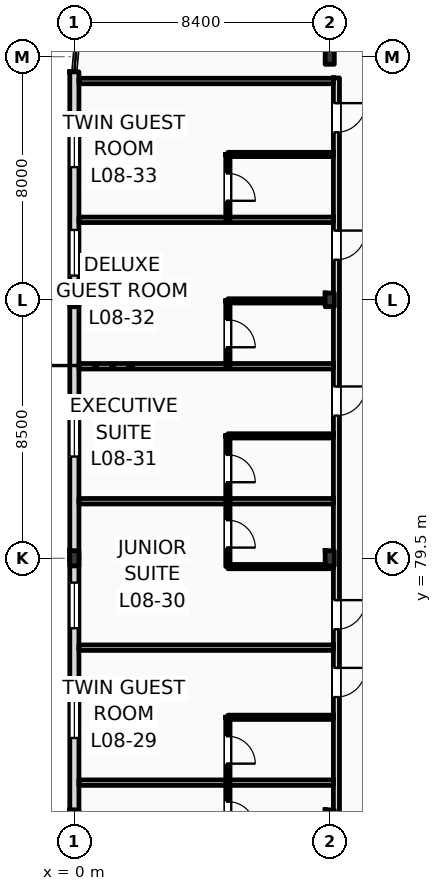
"""IFC4 building model, lengths in metres.
Left out: names, types, materials, properties, quantities, classifications, styles, units other than length and angle.
Written with IfcOpenShell. Run it as: python <this file> out.ifc"""

import sys

from ifc_helpers import new_model, si_unit, direction, frame, frame_2d, origin, origin_2d, place, context, subcontext, project, spatial, rectangle, i_section, extrude, element, fill, save


model = new_model("IFC4")
c1 = context("Model", 3, precision=1e-05, world=origin(), true_north=direction((0.0, 1.0)))
c2 = subcontext(c1, "Body", "Model", "MODEL_VIEW")
j1 = project(units=[si_unit("LENGTHUNIT", "METRE"), si_unit("PLANEANGLEUNIT", "RADIAN")], contexts=[c1])
p1 = place(None, origin())
s1 = spatial("IfcSite", under=j1, at=p1, CompositionType="ELEMENT")
p2 = place(p1, origin())
s2 = spatial("IfcBuilding", under=s1, at=p2, CompositionType="ELEMENT")
p3 = place(p2, frame((0.0, 0.0, 35.4)))
s3 = spatial("IfcBuildingStorey", under=s2, at=p3, CompositionType="ELEMENT", Elevation=35.4)
p4 = place(p3, frame((0.0, 71.0, 0.0), z_axis=(0.0, 0.0, 1.0), x_axis=(1.0, 0.0, 0.0)))
e1 = element("IfcColumn", 1, at=p4, inside=s3, PredefinedType="COLUMN", context=c2, shape_type="SweptSolid", body=[
    extrude(i_section(OverallWidth=0.3, OverallDepth=0.45, WebThickness=0.014, FlangeThickness=0.026, FilletRadius=0.027, at=origin_2d()), origin(), (0.0, 0.0, 1.0), 3.6),
])
p5 = place(p3, frame((0.0, 79.5, 0.0), z_axis=(0.0, 0.0, 1.0), x_axis=(1.0, 0.0, 0.0)))
e2 = element("IfcColumn", 2, at=p5, inside=s3, PredefinedType="COLUMN", context=c2, shape_type="SweptSolid", body=[
    extrude(i_section(OverallWidth=0.3, OverallDepth=0.5, WebThickness=0.014, FlangeThickness=0.028, FilletRadius=0.027, at=origin_2d()), origin(), (0.0, 0.0, 1.0), 3.6),
])
for number, where, z_axis, x_axis in (
    (3, (0.0, 88.0, 0.0), (0.0, 0.0, 1.0), (1.0, 0.0, 0.0)),
    (4, (8.4, 71.0, 0.0), (0.0, 0.0, 1.0), (1.0, 0.0, 0.0)),
):
    element("IfcColumn", number, at=place(p3, frame(where, z_axis=z_axis, x_axis=x_axis)), inside=s3, PredefinedType="COLUMN", context=c2, shape_type="SweptSolid", body=[
        extrude(i_section(OverallWidth=0.3, OverallDepth=0.45, WebThickness=0.014, FlangeThickness=0.026, FilletRadius=0.027, at=origin_2d()), origin(), (0.0, 0.0, 1.0), 3.6),
    ])
p6 = place(p3, frame((8.4, 79.5, 0.0), z_axis=(0.0, 0.0, 1.0), x_axis=(1.0, 0.0, 0.0)))
e5 = element("IfcColumn", 5, at=p6, inside=s3, PredefinedType="COLUMN", context=c2, shape_type="SweptSolid", body=[
    extrude(i_section(OverallWidth=0.3, OverallDepth=0.5, WebThickness=0.014, FlangeThickness=0.028, FilletRadius=0.027, at=origin_2d()), origin(), (0.0, 0.0, 1.0), 3.6),
])
p7 = place(p3, frame((8.4, 88.0, 0.0), z_axis=(0.0, 0.0, 1.0), x_axis=(1.0, 0.0, 0.0)))
e6 = element("IfcColumn", 6, at=p7, inside=s3, PredefinedType="COLUMN", context=c2, shape_type="SweptSolid", body=[
    extrude(i_section(OverallWidth=0.3, OverallDepth=0.45, WebThickness=0.014, FlangeThickness=0.026, FilletRadius=0.027, at=origin_2d()), origin(), (0.0, 0.0, 1.0), 3.6),
])
p8 = place(p3, frame((8.4, 96.0, 0.0), z_axis=(0.0, 0.0, 1.0), x_axis=(1.0, 0.0, 0.0)))
e7 = element("IfcColumn", 7, at=p8, inside=s3, PredefinedType="COLUMN", context=c2, shape_type="SweptSolid", body=[
    extrude(i_section(OverallWidth=0.3, OverallDepth=0.5, WebThickness=0.014, FlangeThickness=0.028, FilletRadius=0.027, at=origin_2d()), origin(), (0.0, 0.0, 1.0), 3.6),
])
p9 = place(p3, frame((0.0, 71.0, 0.0), z_axis=(0.0, 0.0, 1.0), x_axis=(0.0, 1.0, 0.0)))
e8 = element("IfcWall", 8, at=p9, inside=s3, PredefinedType="STANDARD", context=c2, shape_type="SweptSolid", body=[
    extrude(rectangle(XDim=8.5, YDim=0.3, at=frame_2d((4.25, 0.0))), origin(), (0.0, 0.0, 1.0), 3.01),
])
p10 = place(p9, frame((2.59, 0.0, 0.9)))
e9 = element("IfcOpeningElement", 9, at=p10, cuts=e8, PredefinedType="OPENING", context=c2, shape_type="SweptSolid", body=[
    extrude(rectangle(XDim=1.5, YDim=1.93, at=frame_2d((0.75, 0.965))), frame((0.0, 0.16, 0.0), z_axis=(0.0, -1.0, 0.0), x_axis=(1.0, 0.0, 0.0)), (0.0, 0.0, 1.0), 0.32),
])
p11 = place(p9, frame((6.2, 0.0, 0.9)))
e10 = element("IfcOpeningElement", 10, at=p11, cuts=e8, PredefinedType="OPENING", context=c2, shape_type="SweptSolid", body=[
    extrude(rectangle(XDim=1.5, YDim=1.93, at=frame_2d((0.75, 0.965))), frame((0.0, 0.16, 0.0), z_axis=(0.0, -1.0, 0.0), x_axis=(1.0, 0.0, 0.0)), (0.0, 0.0, 1.0), 0.32),
])
p12 = place(p3, frame((0.0, 79.5, 0.0), z_axis=(0.0, 0.0, 1.0), x_axis=(0.0, 1.0, 0.0)))
e11 = element("IfcWall", 11, at=p12, inside=s3, PredefinedType="STANDARD", context=c2, shape_type="SweptSolid", body=[
    extrude(rectangle(XDim=8.5, YDim=0.3, at=frame_2d((4.25, 0.0))), origin(), (0.0, 0.0, 1.0), 3.01),
])
p13 = place(p12, frame((3.347, 0.0, 0.9)))
e12 = element("IfcOpeningElement", 12, at=p13, cuts=e11, PredefinedType="OPENING", context=c2, shape_type="SweptSolid", body=[
    extrude(rectangle(XDim=1.5, YDim=1.93, at=frame_2d((0.75, 0.965))), frame((0.0, 0.16, 0.0), z_axis=(0.0, -1.0, 0.0), x_axis=(1.0, 0.0, 0.0)), (0.0, 0.0, 1.0), 0.32),
])
p14 = place(p3, frame((0.0, 88.0, 0.0), z_axis=(0.0, 0.0, 1.0), x_axis=(0.0, 1.0, 0.0)))
e13 = element("IfcWall", 13, at=p14, inside=s3, PredefinedType="STANDARD", context=c2, shape_type="SweptSolid", body=[
    extrude(rectangle(XDim=7.5, YDim=0.3, at=frame_2d((3.75, 0.0))), origin(), (0.0, 0.0, 1.0), 3.38),
])
p15 = place(p14, frame((0.8, 0.0, 0.9)))
e14 = element("IfcOpeningElement", 14, at=p15, cuts=e13, PredefinedType="OPENING", context=c2, shape_type="SweptSolid", body=[
    extrude(rectangle(XDim=1.5, YDim=2.3, at=frame_2d((0.75, 1.15))), frame((0.0, 0.16, 0.0), z_axis=(0.0, -1.0, 0.0), x_axis=(1.0, 0.0, 0.0)), (0.0, 0.0, 1.0), 0.32),
])
p16 = place(p14, frame((4.367, 0.0, 0.9)))
e15 = element("IfcOpeningElement", 15, at=p16, cuts=e13, PredefinedType="OPENING", context=c2, shape_type="SweptSolid", body=[
    extrude(rectangle(XDim=1.1, YDim=1.5, at=frame_2d((0.55, 0.75))), frame((0.0, 0.16, 0.0), z_axis=(0.0, -1.0, 0.0), x_axis=(1.0, 0.0, 0.0)), (0.0, 0.0, 1.0), 0.32),
])
p17 = place(p3, frame((8.62, 62.64, 0.0), z_axis=(0.0, 0.0, 1.0), x_axis=(0.0, 1.0, 0.0)))
e16 = element("IfcWall", 16, at=p17, inside=s3, PredefinedType="PARTITIONING", context=c2, shape_type="SweptSolid", body=[
    extrude(rectangle(XDim=32.66, YDim=0.2, at=frame_2d((16.33, 0.0))), origin(), (0.0, 0.0, 1.0), 3.01),
])
p18 = place(p17, frame((3.006, 0.0, 0.0)))
e17 = element("IfcOpeningElement", 17, at=p18, cuts=e16, PredefinedType="OPENING", context=c2, shape_type="SweptSolid", body=[
    extrude(rectangle(XDim=0.96, YDim=2.2, at=frame_2d((0.48, 1.1))), frame((0.0, 0.11, 0.0), z_axis=(0.0, -1.0, 0.0), x_axis=(1.0, 0.0, 0.0)), (0.0, 0.0, 1.0), 0.22),
])
p19 = place(p17, frame((5.516, 0.0, 0.0)))
e18 = element("IfcOpeningElement", 18, at=p19, cuts=e16, PredefinedType="OPENING", context=c2, shape_type="SweptSolid", body=[
    extrude(rectangle(XDim=0.96, YDim=2.2, at=frame_2d((0.48, 1.1))), frame((0.0, 0.11, 0.0), z_axis=(0.0, -1.0, 0.0), x_axis=(1.0, 0.0, 0.0)), (0.0, 0.0, 1.0), 0.22),
])
p20 = place(p17, frame((12.295, 0.0, 0.0)))
e19 = element("IfcOpeningElement", 19, at=p20, cuts=e16, PredefinedType="OPENING", context=c2, shape_type="SweptSolid", body=[
    extrude(rectangle(XDim=0.96, YDim=2.2, at=frame_2d((0.48, 1.1))), frame((0.0, 0.11, 0.0), z_axis=(0.0, -1.0, 0.0), x_axis=(1.0, 0.0, 0.0)), (0.0, 0.0, 1.0), 0.22),
])
p21 = place(p17, frame((14.524, 0.0, 0.0)))
e20 = element("IfcOpeningElement", 20, at=p21, cuts=e16, PredefinedType="OPENING", context=c2, shape_type="SweptSolid", body=[
    extrude(rectangle(XDim=0.96, YDim=2.2, at=frame_2d((0.48, 1.1))), frame((0.0, 0.11, 0.0), z_axis=(0.0, -1.0, 0.0), x_axis=(1.0, 0.0, 0.0)), (0.0, 0.0, 1.0), 0.22),
])
p22 = place(p17, frame((21.552, 0.0, 0.0)))
e21 = element("IfcOpeningElement", 21, at=p22, cuts=e16, PredefinedType="OPENING", context=c2, shape_type="SweptSolid", body=[
    extrude(rectangle(XDim=0.96, YDim=2.2, at=frame_2d((0.48, 1.1))), frame((0.0, 0.11, 0.0), z_axis=(0.0, -1.0, 0.0), x_axis=(1.0, 0.0, 0.0)), (0.0, 0.0, 1.0), 0.22),
])
p23 = place(p17, frame((26.68, 0.0, 0.0)))
e22 = element("IfcOpeningElement", 22, at=p23, cuts=e16, PredefinedType="OPENING", context=c2, shape_type="SweptSolid", body=[
    extrude(rectangle(XDim=0.96, YDim=2.2, at=frame_2d((0.48, 1.1))), frame((0.0, 0.11, 0.0), z_axis=(0.0, -1.0, 0.0), x_axis=(1.0, 0.0, 0.0)), (0.0, 0.0, 1.0), 0.22),
])
p24 = place(p17, frame((30.872, 0.0, 0.0)))
e23 = element("IfcOpeningElement", 23, at=p24, cuts=e16, PredefinedType="OPENING", context=c2, shape_type="SweptSolid", body=[
    extrude(rectangle(XDim=0.96, YDim=2.2, at=frame_2d((0.48, 1.1))), frame((0.0, 0.11, 0.0), z_axis=(0.0, -1.0, 0.0), x_axis=(1.0, 0.0, 0.0)), (0.0, 0.0, 1.0), 0.22),
])
p25 = place(p3, frame((0.15, 72.12, 0.0), z_axis=(0.0, 0.0, 1.0), x_axis=(1.0, 0.0, 0.0)))
e24 = element("IfcWall", 24, at=p25, inside=s3, PredefinedType="PARTITIONING", context=c2, shape_type="SweptSolid", body=[
    extrude(rectangle(XDim=8.37, YDim=0.18, at=frame_2d((4.185, 0.0))), origin(), (0.0, 0.0, 1.0), 3.38),
])
p26 = place(p3, frame((5.05, 69.97, 0.0), z_axis=(0.0, 0.0, 1.0), x_axis=(0.0, 1.0, 0.0)))
e25 = element("IfcWall", 25, at=p26, inside=s3, PredefinedType="PARTITIONING", context=c2, shape_type="SweptSolid", body=[
    extrude(rectangle(XDim=2.15, YDim=0.14, at=frame_2d((1.075, 0.0))), origin(), (0.0, 0.0, 1.0), 3.38),
])
p27 = place(p26, frame((0.625, 0.0, 0.0)))
e26 = element("IfcOpeningElement", 26, at=p27, cuts=e25, PredefinedType="OPENING", context=c2, shape_type="SweptSolid", body=[
    extrude(rectangle(XDim=0.9, YDim=2.1, at=frame_2d((0.45, 1.05))), frame((0.0, 0.08, 0.0), z_axis=(0.0, -1.0, 0.0), x_axis=(1.0, 0.0, 0.0)), (0.0, 0.0, 1.0), 0.16),
])
p28 = place(p3, frame((0.15, 76.56, 0.0), z_axis=(0.0, 0.0, 1.0), x_axis=(1.0, 0.0, 0.0)))
e27 = element("IfcWall", 27, at=p28, inside=s3, PredefinedType="PARTITIONING", context=c2, shape_type="SweptSolid", body=[
    extrude(rectangle(XDim=8.37, YDim=0.18, at=frame_2d((4.185, 0.0))), origin(), (0.0, 0.0, 1.0), 3.38),
])
p29 = place(p3, frame((5.05, 74.27, 0.0), z_axis=(0.0, 0.0, 1.0), x_axis=(1.0, 0.0, 0.0)))
e28 = element("IfcWall", 28, at=p29, inside=s3, PredefinedType="PARTITIONING", context=c2, shape_type="SweptSolid", body=[
    extrude(rectangle(XDim=3.47, YDim=0.14, at=frame_2d((1.735, 0.0))), origin(), (0.0, 0.0, 1.0), 3.38),
])
p30 = place(p3, frame((5.05, 72.12, 0.0), z_axis=(0.0, 0.0, 1.0), x_axis=(0.0, 1.0, 0.0)))
e29 = element("IfcWall", 29, at=p30, inside=s3, PredefinedType="PARTITIONING", context=c2, shape_type="SweptSolid", body=[
    extrude(rectangle(XDim=2.15, YDim=0.14, at=frame_2d((1.075, 0.0))), origin(), (0.0, 0.0, 1.0), 3.38),
])
p31 = place(p30, frame((0.625, 0.0, 0.0)))
e30 = element("IfcOpeningElement", 30, at=p31, cuts=e29, PredefinedType="OPENING", context=c2, shape_type="SweptSolid", body=[
    extrude(rectangle(XDim=0.9, YDim=2.1, at=frame_2d((0.45, 1.05))), frame((0.0, 0.08, 0.0), z_axis=(0.0, -1.0, 0.0), x_axis=(1.0, 0.0, 0.0)), (0.0, 0.0, 1.0), 0.16),
])
p32 = place(p3, frame((0.15, 81.377, 0.0), z_axis=(0.0, 0.0, 1.0), x_axis=(1.0, 0.0, 0.0)))
e31 = element("IfcWall", 31, at=p32, inside=s3, PredefinedType="PARTITIONING", context=c2, shape_type="SweptSolid", body=[
    extrude(rectangle(XDim=8.37, YDim=0.18, at=frame_2d((4.185, 0.0))), origin(), (0.0, 0.0, 1.0), 3.38),
])
p33 = place(p3, frame((5.05, 79.227, 0.0), z_axis=(0.0, 0.0, 1.0), x_axis=(1.0, 0.0, 0.0)))
e32 = element("IfcWall", 32, at=p33, inside=s3, PredefinedType="PARTITIONING", context=c2, shape_type="SweptSolid", body=[
    extrude(rectangle(XDim=3.47, YDim=0.14, at=frame_2d((1.735, 0.0))), origin(), (0.0, 0.0, 1.0), 3.38),
])
p34 = place(p3, frame((5.05, 79.227, 0.0), z_axis=(0.0, 0.0, 1.0), x_axis=(0.0, 1.0, 0.0)))
e33 = element("IfcWall", 33, at=p34, inside=s3, PredefinedType="PARTITIONING", context=c2, shape_type="SweptSolid", body=[
    extrude(rectangle(XDim=2.15, YDim=0.14, at=frame_2d((1.075, 0.0))), origin(), (0.0, 0.0, 1.0), 3.38),
])
p35 = place(p34, frame((0.625, 0.0, 0.0)))
e34 = element("IfcOpeningElement", 34, at=p35, cuts=e33, PredefinedType="OPENING", context=c2, shape_type="SweptSolid", body=[
    extrude(rectangle(XDim=0.9, YDim=2.1, at=frame_2d((0.45, 1.05))), frame((0.0, 0.08, 0.0), z_axis=(0.0, -1.0, 0.0), x_axis=(1.0, 0.0, 0.0)), (0.0, 0.0, 1.0), 0.16),
])
p36 = place(p3, frame((0.15, 85.817, 0.0), z_axis=(0.0, 0.0, 1.0), x_axis=(1.0, 0.0, 0.0)))
e35 = element("IfcWall", 35, at=p36, inside=s3, PredefinedType="PARTITIONING", context=c2, shape_type="SweptSolid", body=[
    extrude(rectangle(XDim=8.37, YDim=0.18, at=frame_2d((4.185, 0.0))), origin(), (0.0, 0.0, 1.0), 3.38),
])
p37 = place(p3, frame((5.05, 83.527, 0.0), z_axis=(0.0, 0.0, 1.0), x_axis=(1.0, 0.0, 0.0)))
e36 = element("IfcWall", 36, at=p37, inside=s3, PredefinedType="PARTITIONING", context=c2, shape_type="SweptSolid", body=[
    extrude(rectangle(XDim=3.47, YDim=0.14, at=frame_2d((1.735, 0.0))), origin(), (0.0, 0.0, 1.0), 3.38),
])
p38 = place(p3, frame((5.05, 81.377, 0.0), z_axis=(0.0, 0.0, 1.0), x_axis=(0.0, 1.0, 0.0)))
e37 = element("IfcWall", 37, at=p38, inside=s3, PredefinedType="PARTITIONING", context=c2, shape_type="SweptSolid", body=[
    extrude(rectangle(XDim=2.15, YDim=0.14, at=frame_2d((1.075, 0.0))), origin(), (0.0, 0.0, 1.0), 3.38),
])
p39 = place(p38, frame((0.625, 0.0, 0.0)))
e38 = element("IfcOpeningElement", 38, at=p39, cuts=e37, PredefinedType="OPENING", context=c2, shape_type="SweptSolid", body=[
    extrude(rectangle(XDim=0.9, YDim=2.1, at=frame_2d((0.45, 1.05))), frame((0.0, 0.08, 0.0), z_axis=(0.0, -1.0, 0.0), x_axis=(1.0, 0.0, 0.0)), (0.0, 0.0, 1.0), 0.16),
])
p40 = place(p3, frame((0.15, 90.634, 0.0), z_axis=(0.0, 0.0, 1.0), x_axis=(1.0, 0.0, 0.0)))
e39 = element("IfcWall", 39, at=p40, inside=s3, PredefinedType="PARTITIONING", context=c2, shape_type="SweptSolid", body=[
    extrude(rectangle(XDim=8.37, YDim=0.18, at=frame_2d((4.185, 0.0))), origin(), (0.0, 0.0, 1.0), 3.38),
])
p41 = place(p3, frame((5.05, 87.967, 0.0), z_axis=(0.0, 0.0, 1.0), x_axis=(1.0, 0.0, 0.0)))
e40 = element("IfcWall", 40, at=p41, inside=s3, PredefinedType="PARTITIONING", context=c2, shape_type="SweptSolid", body=[
    extrude(rectangle(XDim=3.47, YDim=0.14, at=frame_2d((1.735, 0.0))), origin(), (0.0, 0.0, 1.0), 2.82),
])
p42 = place(p3, frame((5.05, 85.817, 0.0), z_axis=(0.0, 0.0, 1.0), x_axis=(0.0, 1.0, 0.0)))
e41 = element("IfcWall", 41, at=p42, inside=s3, PredefinedType="PARTITIONING", context=c2, shape_type="SweptSolid", body=[
    extrude(rectangle(XDim=2.15, YDim=0.14, at=frame_2d((1.075, 0.0))), origin(), (0.0, 0.0, 1.0), 3.38),
])
p43 = place(p42, frame((0.625, 0.0, 0.0)))
e42 = element("IfcOpeningElement", 42, at=p43, cuts=e41, PredefinedType="OPENING", context=c2, shape_type="SweptSolid", body=[
    extrude(rectangle(XDim=0.9, YDim=2.1, at=frame_2d((0.45, 1.05))), frame((0.0, 0.08, 0.0), z_axis=(0.0, -1.0, 0.0), x_axis=(1.0, 0.0, 0.0)), (0.0, 0.0, 1.0), 0.16),
])
p44 = place(p3, frame((0.15, 95.2, 0.0), z_axis=(0.0, 0.0, 1.0), x_axis=(1.0, 0.0, 0.0)))
e43 = element("IfcWall", 43, at=p44, inside=s3, PredefinedType="PARTITIONING", context=c2, shape_type="SweptSolid", body=[
    extrude(rectangle(XDim=8.37, YDim=0.18, at=frame_2d((4.185, 0.0))), origin(), (0.0, 0.0, 1.0), 3.38),
])
p45 = place(p3, frame((5.05, 92.784, 0.0), z_axis=(0.0, 0.0, 1.0), x_axis=(1.0, 0.0, 0.0)))
e44 = element("IfcWall", 44, at=p45, inside=s3, PredefinedType="PARTITIONING", context=c2, shape_type="SweptSolid", body=[
    extrude(rectangle(XDim=3.47, YDim=0.14, at=frame_2d((1.735, 0.0))), origin(), (0.0, 0.0, 1.0), 3.38),
])
p46 = place(p3, frame((5.05, 90.634, 0.0), z_axis=(0.0, 0.0, 1.0), x_axis=(0.0, 1.0, 0.0)))
e45 = element("IfcWall", 45, at=p46, inside=s3, PredefinedType="PARTITIONING", context=c2, shape_type="SweptSolid", body=[
    extrude(rectangle(XDim=2.15, YDim=0.14, at=frame_2d((1.075, 0.0))), origin(), (0.0, 0.0, 1.0), 3.38),
])
p47 = place(p46, frame((0.625, 0.0, 0.0)))
e46 = element("IfcOpeningElement", 46, at=p47, cuts=e45, PredefinedType="OPENING", context=c2, shape_type="SweptSolid", body=[
    extrude(rectangle(XDim=0.9, YDim=2.1, at=frame_2d((0.45, 1.05))), frame((0.0, 0.08, 0.0), z_axis=(0.0, -1.0, 0.0), x_axis=(1.0, 0.0, 0.0)), (0.0, 0.0, 1.0), 0.16),
])
p48 = place(p10, origin())
e47 = element("IfcWindow", 47, at=p48, inside=s3, PartitioningType="DOUBLE_PANEL_VERTICAL", PredefinedType="WINDOW", context=c2, shape_type="SweptSolid", body=[
    extrude(rectangle(XDim=1.5, YDim=1.93, at=frame_2d((0.75, 0.965))), frame((0.0, 0.03, 0.0), z_axis=(0.0, -1.0, 0.0), x_axis=(1.0, 0.0, 0.0)), (0.0, 0.0, 1.0), 0.06),
])
fill(e9, e47)
p49 = place(p11, origin())
e48 = element("IfcWindow", 48, at=p49, inside=s3, PartitioningType="DOUBLE_PANEL_VERTICAL", PredefinedType="WINDOW", context=c2, shape_type="SweptSolid", body=[
    extrude(rectangle(XDim=1.5, YDim=1.93, at=frame_2d((0.75, 0.965))), frame((0.0, 0.03, 0.0), z_axis=(0.0, -1.0, 0.0), x_axis=(1.0, 0.0, 0.0)), (0.0, 0.0, 1.0), 0.06),
])
fill(e10, e48)
p50 = place(p13, origin())
e49 = element("IfcWindow", 49, at=p50, inside=s3, PartitioningType="DOUBLE_PANEL_VERTICAL", PredefinedType="WINDOW", context=c2, shape_type="SweptSolid", body=[
    extrude(rectangle(XDim=1.5, YDim=1.93, at=frame_2d((0.75, 0.965))), frame((0.0, 0.03, 0.0), z_axis=(0.0, -1.0, 0.0), x_axis=(1.0, 0.0, 0.0)), (0.0, 0.0, 1.0), 0.06),
])
fill(e12, e49)
p51 = place(p15, origin())
e50 = element("IfcWindow", 50, at=p51, inside=s3, PartitioningType="DOUBLE_PANEL_VERTICAL", PredefinedType="WINDOW", context=c2, shape_type="SweptSolid", body=[
    extrude(rectangle(XDim=1.5, YDim=2.3, at=frame_2d((0.75, 1.15))), frame((0.0, 0.03, 0.0), z_axis=(0.0, -1.0, 0.0), x_axis=(1.0, 0.0, 0.0)), (0.0, 0.0, 1.0), 0.06),
])
fill(e14, e50)
p52 = place(p16, origin())
e51 = element("IfcWindow", 51, at=p52, inside=s3, PartitioningType="DOUBLE_PANEL_VERTICAL", PredefinedType="WINDOW", context=c2, shape_type="SweptSolid", body=[
    extrude(rectangle(XDim=1.1, YDim=1.5, at=frame_2d((0.55, 0.75))), frame((0.0, 0.03, 0.0), z_axis=(0.0, -1.0, 0.0), x_axis=(1.0, 0.0, 0.0)), (0.0, 0.0, 1.0), 0.06),
])
fill(e15, e51)
p53 = place(p27, frame((0.9, 0.0, 0.0), z_axis=(0.0, 0.0, 1.0), x_axis=(-1.0, 0.0, 0.0)))
e52 = element("IfcDoor", 52, at=p53, inside=s3, OperationType="SINGLE_SWING_LEFT", PredefinedType="DOOR", context=c2, shape_type="SweptSolid", body=[
    extrude(rectangle(XDim=0.9, YDim=2.1, at=frame_2d((0.45, 1.05))), frame((0.0, 0.025, 0.0), z_axis=(0.0, -1.0, 0.0), x_axis=(1.0, 0.0, 0.0)), (0.0, 0.0, 1.0), 0.05),
])
fill(e26, e52)
p54 = place(p20, frame((0.96, 0.0, 0.0), z_axis=(0.0, 0.0, 1.0), x_axis=(-1.0, 0.0, 0.0)))
e53 = element("IfcDoor", 53, at=p54, inside=s3, OperationType="SINGLE_SWING_RIGHT", PredefinedType="DOOR", context=c2, shape_type="SweptSolid", body=[
    extrude(rectangle(XDim=0.96, YDim=2.2, at=frame_2d((0.48, 1.1))), frame((0.0, 0.025, 0.0), z_axis=(0.0, -1.0, 0.0), x_axis=(1.0, 0.0, 0.0)), (0.0, 0.0, 1.0), 0.05),
])
fill(e19, e53)
p55 = place(p31, frame((0.9, 0.0, 0.0), z_axis=(0.0, 0.0, 1.0), x_axis=(-1.0, 0.0, 0.0)))
e54 = element("IfcDoor", 54, at=p55, inside=s3, OperationType="SINGLE_SWING_LEFT", PredefinedType="DOOR", context=c2, shape_type="SweptSolid", body=[
    extrude(rectangle(XDim=0.9, YDim=2.1, at=frame_2d((0.45, 1.05))), frame((0.0, 0.025, 0.0), z_axis=(0.0, -1.0, 0.0), x_axis=(1.0, 0.0, 0.0)), (0.0, 0.0, 1.0), 0.05),
])
fill(e30, e54)
p56 = place(p21, frame((0.96, 0.0, 0.0), z_axis=(0.0, 0.0, 1.0), x_axis=(-1.0, 0.0, 0.0)))
e55 = element("IfcDoor", 55, at=p56, inside=s3, OperationType="SINGLE_SWING_RIGHT", PredefinedType="DOOR", context=c2, shape_type="SweptSolid", body=[
    extrude(rectangle(XDim=0.96, YDim=2.2, at=frame_2d((0.48, 1.1))), frame((0.0, 0.025, 0.0), z_axis=(0.0, -1.0, 0.0), x_axis=(1.0, 0.0, 0.0)), (0.0, 0.0, 1.0), 0.05),
])
fill(e20, e55)
p57 = place(p35, frame((0.9, 0.0, 0.0), z_axis=(0.0, 0.0, 1.0), x_axis=(-1.0, 0.0, 0.0)))
e56 = element("IfcDoor", 56, at=p57, inside=s3, OperationType="SINGLE_SWING_LEFT", PredefinedType="DOOR", context=c2, shape_type="SweptSolid", body=[
    extrude(rectangle(XDim=0.9, YDim=2.1, at=frame_2d((0.45, 1.05))), frame((0.0, 0.025, 0.0), z_axis=(0.0, -1.0, 0.0), x_axis=(1.0, 0.0, 0.0)), (0.0, 0.0, 1.0), 0.05),
])
fill(e34, e56)
p58 = place(p22, frame((0.96, 0.0, 0.0), z_axis=(0.0, 0.0, 1.0), x_axis=(-1.0, 0.0, 0.0)))
e57 = element("IfcDoor", 57, at=p58, inside=s3, OperationType="SINGLE_SWING_RIGHT", PredefinedType="DOOR", context=c2, shape_type="SweptSolid", body=[
    extrude(rectangle(XDim=0.96, YDim=2.2, at=frame_2d((0.48, 1.1))), frame((0.0, 0.025, 0.0), z_axis=(0.0, -1.0, 0.0), x_axis=(1.0, 0.0, 0.0)), (0.0, 0.0, 1.0), 0.05),
])
fill(e21, e57)
p59 = place(p39, frame((0.9, 0.0, 0.0), z_axis=(0.0, 0.0, 1.0), x_axis=(-1.0, 0.0, 0.0)))
e58 = element("IfcDoor", 58, at=p59, inside=s3, OperationType="SINGLE_SWING_LEFT", PredefinedType="DOOR", context=c2, shape_type="SweptSolid", body=[
    extrude(rectangle(XDim=0.9, YDim=2.1, at=frame_2d((0.45, 1.05))), frame((0.0, 0.025, 0.0), z_axis=(0.0, -1.0, 0.0), x_axis=(1.0, 0.0, 0.0)), (0.0, 0.0, 1.0), 0.05),
])
fill(e38, e58)
p60 = place(p23, frame((0.96, 0.0, 0.0), z_axis=(0.0, 0.0, 1.0), x_axis=(-1.0, 0.0, 0.0)))
e59 = element("IfcDoor", 59, at=p60, inside=s3, OperationType="SINGLE_SWING_RIGHT", PredefinedType="DOOR", context=c2, shape_type="SweptSolid", body=[
    extrude(rectangle(XDim=0.96, YDim=2.2, at=frame_2d((0.48, 1.1))), frame((0.0, 0.025, 0.0), z_axis=(0.0, -1.0, 0.0), x_axis=(1.0, 0.0, 0.0)), (0.0, 0.0, 1.0), 0.05),
])
fill(e22, e59)
p61 = place(p43, frame((0.9, 0.0, 0.0), z_axis=(0.0, 0.0, 1.0), x_axis=(-1.0, 0.0, 0.0)))
e60 = element("IfcDoor", 60, at=p61, inside=s3, OperationType="SINGLE_SWING_LEFT", PredefinedType="DOOR", context=c2, shape_type="SweptSolid", body=[
    extrude(rectangle(XDim=0.9, YDim=2.1, at=frame_2d((0.45, 1.05))), frame((0.0, 0.025, 0.0), z_axis=(0.0, -1.0, 0.0), x_axis=(1.0, 0.0, 0.0)), (0.0, 0.0, 1.0), 0.05),
])
fill(e42, e60)
p62 = place(p24, frame((0.96, 0.0, 0.0), z_axis=(0.0, 0.0, 1.0), x_axis=(-1.0, 0.0, 0.0)))
e61 = element("IfcDoor", 61, at=p62, inside=s3, OperationType="SINGLE_SWING_RIGHT", PredefinedType="DOOR", context=c2, shape_type="SweptSolid", body=[
    extrude(rectangle(XDim=0.96, YDim=2.2, at=frame_2d((0.48, 1.1))), frame((0.0, 0.025, 0.0), z_axis=(0.0, -1.0, 0.0), x_axis=(1.0, 0.0, 0.0)), (0.0, 0.0, 1.0), 0.05),
])
fill(e23, e61)
p63 = place(p47, frame((0.9, 0.0, 0.0), z_axis=(0.0, 0.0, 1.0), x_axis=(-1.0, 0.0, 0.0)))
e62 = element("IfcDoor", 62, at=p63, inside=s3, OperationType="SINGLE_SWING_LEFT", PredefinedType="DOOR", context=c2, shape_type="SweptSolid", body=[
    extrude(rectangle(XDim=0.9, YDim=2.1, at=frame_2d((0.45, 1.05))), frame((0.0, 0.025, 0.0), z_axis=(0.0, -1.0, 0.0), x_axis=(1.0, 0.0, 0.0)), (0.0, 0.0, 1.0), 0.05),
])
fill(e46, e62)
save(model, sys.argv[1])
